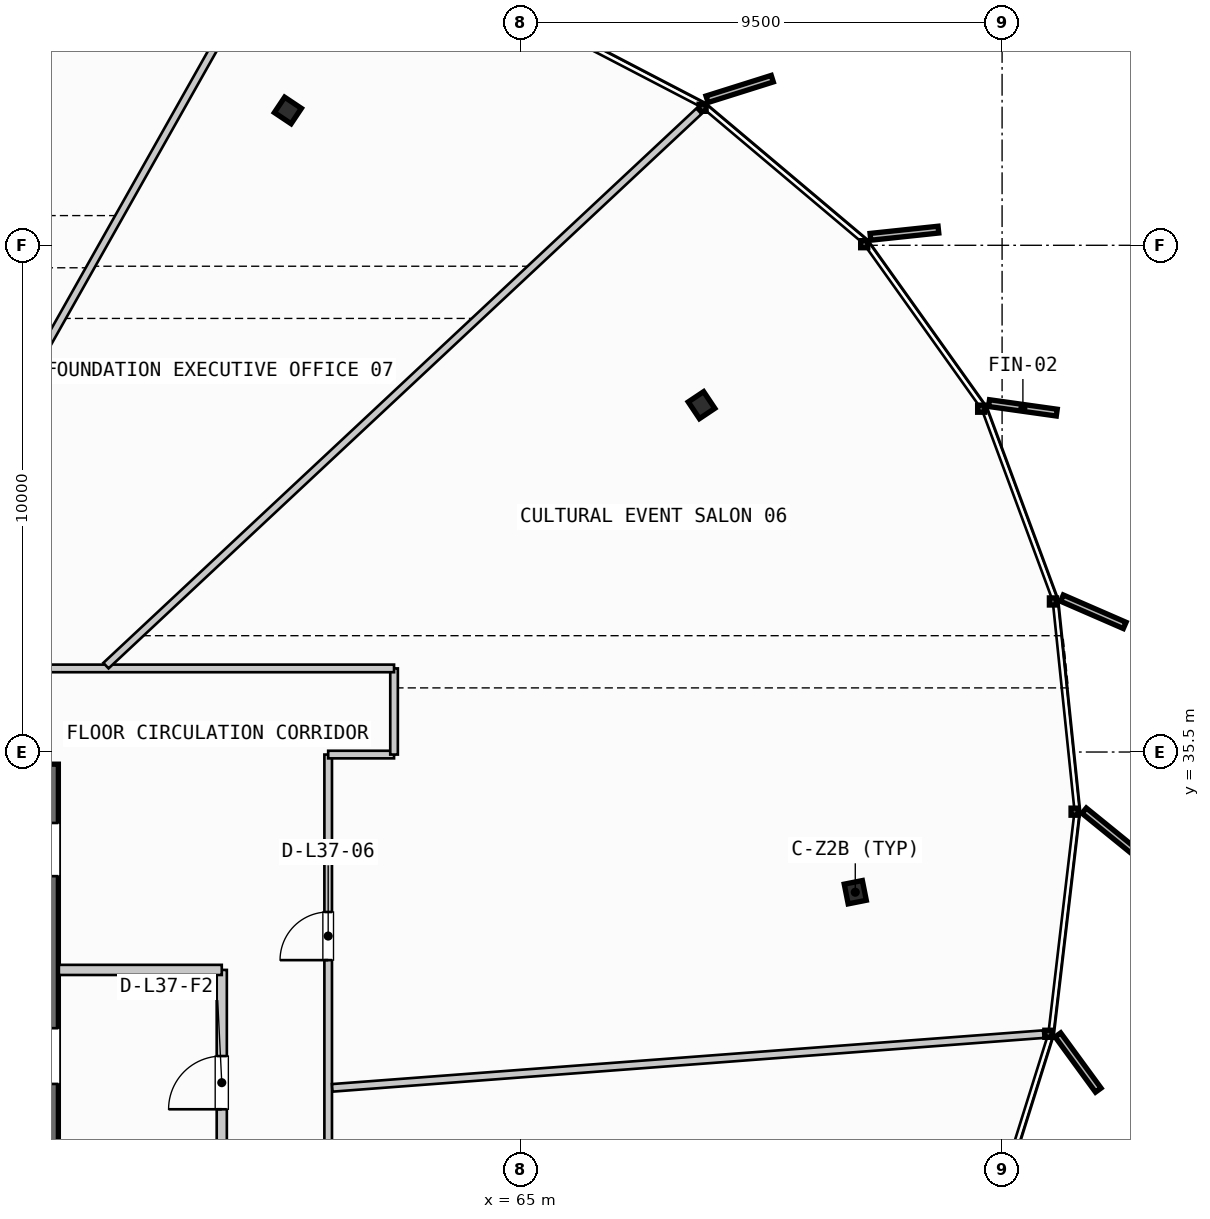
"""IFC4 building model, lengths in metres.
Left out: names, types, materials, properties, quantities, classifications, styles, units other than length and angle.
Written with IfcOpenShell. Run it as: python <this file> out.ifc"""

import sys

from ifc_helpers import new_model, si_unit, direction, frame, frame_2d, origin, origin_2d, place, context, subcontext, project, spatial, rectangle, i_section, extrude, source, transform, mapped, element, fill, save


model = new_model("IFC4")
c1 = context("Model", 3, precision=1e-05, world=origin(), true_north=direction((0.0, 1.0)))
c2 = subcontext(c1, "Body", "Model", "MODEL_VIEW")
j1 = project(units=[si_unit("LENGTHUNIT", "METRE"), si_unit("PLANEANGLEUNIT", "RADIAN")], contexts=[c1])
p1 = place(None, origin())
s1 = spatial("IfcSite", under=j1, at=p1, CompositionType="ELEMENT")
p2 = place(p1, origin())
s2 = spatial("IfcBuilding", under=s1, at=p2, CompositionType="ELEMENT")
p3 = place(p2, frame((0.0, 0.0, 146.55)))
s3 = spatial("IfcBuildingStorey", under=s2, at=p3, CompositionType="ELEMENT", Elevation=146.55)
p4 = place(p3, frame((55.6, 20.34, 0.0), z_axis=(0.0, 0.0, 1.0), x_axis=(0.0, 1.0, 0.0)))
e1 = element("IfcWall", 1, at=p4, inside=s3, PredefinedType="SHEAR", context=c2, shape_type="SweptSolid", body=[
    extrude(rectangle(XDim=14.92, YDim=0.55, at=frame_2d((7.46, 0.0))), origin(), (0.0, 0.0, 1.0), 3.3),
])
p5 = place(p4, frame((12.71, 0.0, 0.0)))
e2 = element("IfcOpeningElement", 2, at=p5, cuts=e1, PredefinedType="OPENING", context=c2, shape_type="SweptSolid", body=[
    extrude(rectangle(XDim=1.05, YDim=2.15, at=frame_2d((0.525, 1.075))), frame((0.0, 0.285, 0.0), z_axis=(0.0, -1.0, 0.0), x_axis=(1.0, 0.0, 0.0)), (0.0, 0.0, 1.0), 0.57),
])
p6 = place(p4, frame((8.61, 0.0, 0.0)))
e3 = element("IfcOpeningElement", 3, at=p6, cuts=e1, PredefinedType="OPENING", context=c2, shape_type="SweptSolid", body=[
    extrude(rectangle(XDim=1.1, YDim=2.2, at=frame_2d((0.55, 1.1))), frame((0.0, 0.285, 0.0), z_axis=(0.0, -1.0, 0.0), x_axis=(1.0, 0.0, 0.0)), (0.0, 0.0, 1.0), 0.57),
])
m1 = source(origin(), c2, "Body", "SweptSolid", [
    extrude(i_section(OverallWidth=0.397, OverallDepth=0.365, WebThickness=0.028, FlangeThickness=0.044, FilletRadius=0.015, at=origin_2d()), origin(), (0.0, 0.0, 1.0), 3.3),
])
for number, where, z_axis, x_axis in (
    (4, (71.603, 32.733, 0.0), (0.0, 0.0, 1.0), (0.981, 0.195, 0.0)),
    (5, (68.569, 42.345, 0.0), (0.0, 0.0, 1.0), (0.831, 0.556, 0.0)),
    (6, (60.405, 48.161, 0.0), (0.0, 0.0, 1.0), (0.556, 0.831, 0.0)),
):
    element("IfcColumn", number, at=place(p3, frame(where, z_axis=z_axis, x_axis=x_axis)), inside=s3, PredefinedType="COLUMN", context=c2, shape_type="MappedRepresentation", body=[
        mapped(m1, transform((0.0, 0.0, 0.0), scale=1.0)),
    ])
p7 = place(p3, frame((59.1, 26.8, 0.0), z_axis=(0.0, 0.0, 1.0), x_axis=(0.0, 1.0, 0.0)))
e7 = element("IfcWall", 7, at=p7, inside=s3, PredefinedType="PARTITIONING", context=c2, shape_type="SweptSolid", body=[
    extrude(rectangle(XDim=4.4, YDim=0.2, at=frame_2d((2.2, 0.0))), origin(), (0.0, 0.0, 1.0), 2.305),
])
p8 = place(p7, frame((1.65, 0.0, 0.0)))
e8 = element("IfcOpeningElement", 8, at=p8, cuts=e7, PredefinedType="OPENING", context=c2, shape_type="SweptSolid", body=[
    extrude(rectangle(XDim=1.05, YDim=2.15, at=frame_2d((0.525, 1.075))), frame((0.0, 0.11, 0.0), z_axis=(0.0, -1.0, 0.0), x_axis=(1.0, 0.0, 0.0)), (0.0, 0.0, 1.0), 0.22),
])
p9 = place(p3, frame((55.885, 31.2, 0.0), z_axis=(0.0, 0.0, 1.0), x_axis=(1.0, 0.0, 0.0)))
e9 = element("IfcWall", 9, at=p9, inside=s3, PredefinedType="PARTITIONING", context=c2, shape_type="SweptSolid", body=[
    extrude(rectangle(XDim=3.215, YDim=0.2, at=frame_2d((1.607, 0.0))), origin(), (0.0, 0.0, 1.0), 2.305),
])
p10 = place(p3, frame((61.2, 20.15, 0.0), z_axis=(0.0, 0.0, 1.0), x_axis=(0.0, 1.0, 0.0)))
e10 = element("IfcWall", 10, at=p10, inside=s3, PredefinedType="PARTITIONING", context=c2, shape_type="SweptSolid", body=[
    extrude(rectangle(XDim=15.3, YDim=0.15, at=frame_2d((7.65, 0.0))), origin(), (0.0, 0.0, 1.0), 2.305),
])
p11 = place(p10, frame((1.71, 0.0, 0.0)))
e11 = element("IfcOpeningElement", 11, at=p11, cuts=e10, PredefinedType="OPENING", context=c2, shape_type="SweptSolid", body=[
    extrude(rectangle(XDim=0.95, YDim=2.15, at=frame_2d((0.475, 1.075))), frame((0.0, 0.085, 0.0), z_axis=(0.0, -1.0, 0.0), x_axis=(1.0, 0.0, 0.0)), (0.0, 0.0, 1.0), 0.17),
])
p12 = place(p10, frame((5.774, 0.0, 0.0)))
e12 = element("IfcOpeningElement", 12, at=p12, cuts=e10, PredefinedType="OPENING", context=c2, shape_type="SweptSolid", body=[
    extrude(rectangle(XDim=0.95, YDim=2.15, at=frame_2d((0.475, 1.075))), frame((0.0, 0.085, 0.0), z_axis=(0.0, -1.0, 0.0), x_axis=(1.0, 0.0, 0.0)), (0.0, 0.0, 1.0), 0.17),
])
p13 = place(p10, frame((11.243, 0.0, 0.0)))
e13 = element("IfcOpeningElement", 13, at=p13, cuts=e10, PredefinedType="OPENING", context=c2, shape_type="SweptSolid", body=[
    extrude(rectangle(XDim=0.95, YDim=2.15, at=frame_2d((0.475, 1.075))), frame((0.0, 0.085, 0.0), z_axis=(0.0, -1.0, 0.0), x_axis=(1.0, 0.0, 0.0)), (0.0, 0.0, 1.0), 0.17),
])
p14 = place(p3, frame((61.2, 35.45, 0.0), z_axis=(0.0, 0.0, 1.0), x_axis=(1.0, 0.0, 0.0)))
e14 = element("IfcWall", 14, at=p14, inside=s3, PredefinedType="PARTITIONING", context=c2, shape_type="SweptSolid", body=[
    extrude(rectangle(XDim=1.3, YDim=0.15, at=frame_2d((0.65, 0.0))), origin(), (0.0, 0.0, 1.0), 2.305),
])
p15 = place(p3, frame((62.5, 35.45, 0.0), z_axis=(0.0, 0.0, 1.0), x_axis=(0.0, 1.0, 0.0)))
e15 = element("IfcWall", 15, at=p15, inside=s3, PredefinedType="PARTITIONING", context=c2, shape_type="SweptSolid", body=[
    extrude(rectangle(XDim=1.7, YDim=0.15, at=frame_2d((0.85, 0.0))), origin(), (0.0, 0.0, 1.0), 2.305),
])
p16 = place(p3, frame((62.5, 37.15, 0.0), z_axis=(0.0, 0.0, 1.0), x_axis=(-1.0, 0.0, 0.0)))
e16 = element("IfcWall", 16, at=p16, inside=s3, PredefinedType="PARTITIONING", context=c2, shape_type="SweptSolid", body=[
    extrude(rectangle(XDim=31.4, YDim=0.15, at=frame_2d((15.7, 0.0))), origin(), (0.0, 0.0, 1.0), 2.305),
])
p17 = place(p16, frame((7.561, 0.0, 0.0)))
e17 = element("IfcOpeningElement", 17, at=p17, cuts=e16, PredefinedType="OPENING", context=c2, shape_type="SweptSolid", body=[
    extrude(rectangle(XDim=0.95, YDim=2.15, at=frame_2d((0.475, 1.075))), frame((0.0, 0.085, 0.0), z_axis=(0.0, -1.0, 0.0), x_axis=(1.0, 0.0, 0.0)), (0.0, 0.0, 1.0), 0.17),
])
p18 = place(p16, frame((13.901, 0.0, 0.0)))
e18 = element("IfcOpeningElement", 18, at=p18, cuts=e16, PredefinedType="OPENING", context=c2, shape_type="SweptSolid", body=[
    extrude(rectangle(XDim=0.95, YDim=2.15, at=frame_2d((0.475, 1.075))), frame((0.0, 0.085, 0.0), z_axis=(0.0, -1.0, 0.0), x_axis=(1.0, 0.0, 0.0)), (0.0, 0.0, 1.0), 0.17),
])
p19 = place(p16, frame((22.573, 0.0, 0.0)))
e19 = element("IfcOpeningElement", 19, at=p19, cuts=e16, PredefinedType="OPENING", context=c2, shape_type="SweptSolid", body=[
    extrude(rectangle(XDim=0.95, YDim=2.15, at=frame_2d((0.475, 1.075))), frame((0.0, 0.085, 0.0), z_axis=(0.0, -1.0, 0.0), x_axis=(1.0, 0.0, 0.0)), (0.0, 0.0, 1.0), 0.17),
])
p20 = place(p3, frame((61.28, 28.873, 0.0), z_axis=(0.0, 0.0, 1.0), x_axis=(0.997160459413, 0.075306162981, 0.0)))
e20 = element("IfcWall", 20, at=p20, inside=s3, PredefinedType="PARTITIONING", context=c2, shape_type="SweptSolid", body=[
    extrude(rectangle(XDim=14.073, YDim=0.15, at=frame_2d((7.037, 0.0))), origin(), (0.0, 0.0, 1.0), 2.305),
])
p21 = place(p3, frame((56.814, 37.205, 0.0), z_axis=(0.0, 0.0, 1.0), x_axis=(0.730459008083, 0.68295654145, 0.0)))
e21 = element("IfcWall", 21, at=p21, inside=s3, PredefinedType="PARTITIONING", context=c2, shape_type="SweptSolid", body=[
    extrude(rectangle(XDim=16.02, YDim=0.15, at=frame_2d((8.01, 0.0))), origin(), (0.0, 0.0, 1.0), 2.305),
])
p22 = place(p3, frame((52.082, 37.22, 0.0), z_axis=(0.0, 0.0, 1.0), x_axis=(0.49120982272, 0.871041279196, 0.0)))
e22 = element("IfcWall", 22, at=p22, inside=s3, PredefinedType="PARTITIONING", context=c2, shape_type="SweptSolid", body=[
    extrude(rectangle(XDim=16.418, YDim=0.15, at=frame_2d((8.209, 0.0))), origin(), (0.0, 0.0, 1.0), 2.305),
])
m2 = source(origin(), c2, "Body", "SweptSolid", [
    extrude(rectangle(XDim=1.05, YDim=2.15, at=frame_2d((0.525, 1.075))), frame((0.0, 0.025, 0.0), z_axis=(0.0, -1.0, 0.0), x_axis=(1.0, 0.0, 0.0)), (0.0, 0.0, 1.0), 0.05),
])
p23 = place(p8, origin())
e23 = element("IfcDoor", 23, at=p23, inside=s3, OperationType="SINGLE_SWING_LEFT", PredefinedType="DOOR", context=c2, shape_type="MappedRepresentation", body=[
    mapped(m2, transform((0.0, 0.0, 0.0), scale=1.0)),
])
fill(e8, e23)
m3 = source(origin(), c2, "Body", "SweptSolid", [
    extrude(rectangle(XDim=0.95, YDim=2.15, at=frame_2d((0.475, 1.075))), frame((0.0, 0.025, 0.0), z_axis=(0.0, -1.0, 0.0), x_axis=(1.0, 0.0, 0.0)), (0.0, 0.0, 1.0), 0.05),
])
p24 = place(p13, origin())
e24 = element("IfcDoor", 24, at=p24, inside=s3, OperationType="SINGLE_SWING_LEFT", PredefinedType="DOOR", context=c2, shape_type="MappedRepresentation", body=[
    mapped(m3, transform((0.0, 0.0, 0.0), scale=1.0)),
])
fill(e13, e24)
save(model, sys.argv[1])
